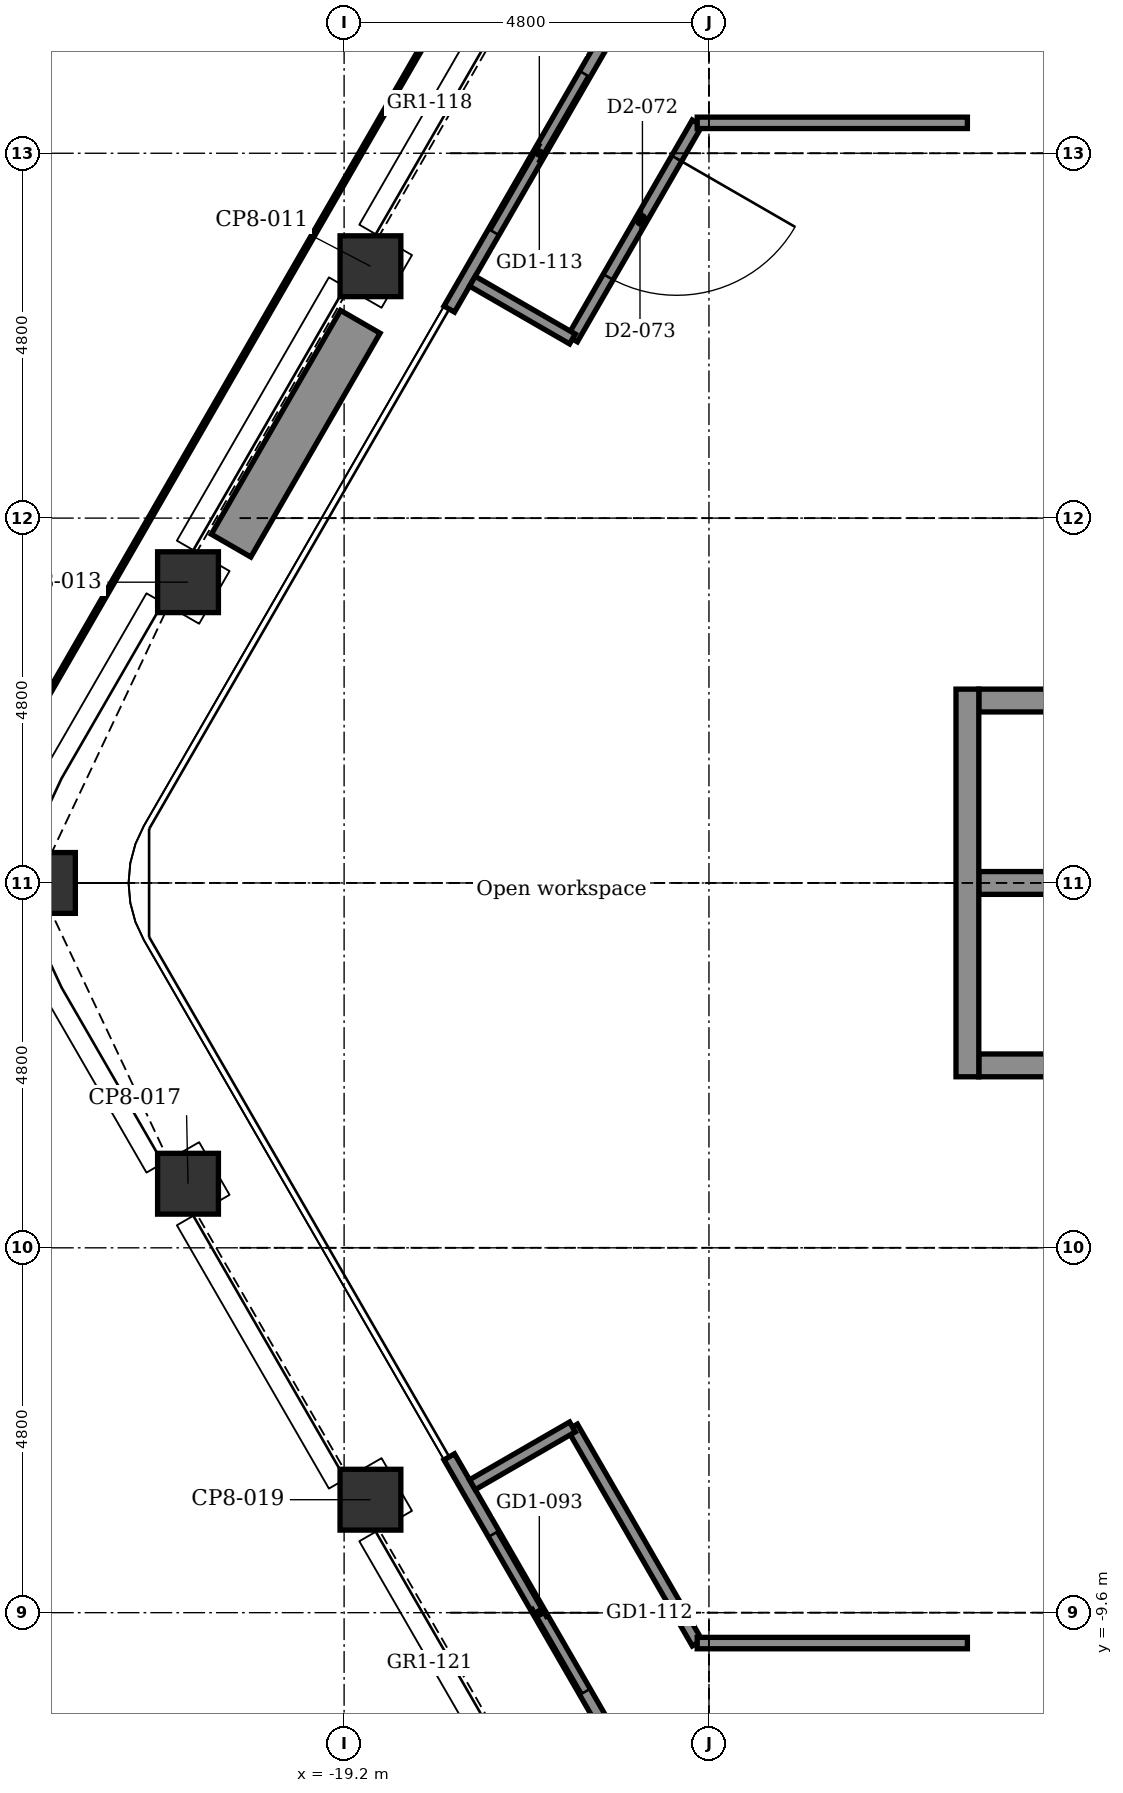
"""IFC4 building model, lengths in metres.
Left out: names, types, materials, properties, quantities, classifications, styles, units other than length and angle.
Written with IfcOpenShell. Run it as: python <this file> out.ifc"""

import sys

from ifc_helpers import new_model, si_unit, direction, frame, frame_2d, origin, origin_2d, place, context, subcontext, project, spatial, rectangle, extrude, element, fill, save


model = new_model("IFC4")
c1 = context("Model", 3, precision=1e-05, world=origin(), true_north=direction((0.0, 1.0)))
c2 = subcontext(c1, "Body", "Model", "MODEL_VIEW")
j1 = project(units=[si_unit("LENGTHUNIT", "METRE"), si_unit("PLANEANGLEUNIT", "RADIAN")], contexts=[c1])
p1 = place(None, origin())
s1 = spatial("IfcSite", under=j1, at=p1, CompositionType="ELEMENT")
p2 = place(p1, origin())
s2 = spatial("IfcBuilding", under=s1, at=p2, CompositionType="ELEMENT")
p3 = place(p2, frame((0.0, 0.0, 257.9)))
s3 = spatial("IfcBuildingStorey", under=s2, at=p3, CompositionType="ELEMENT", Elevation=257.9)
for number, where, z_axis, x_axis in (
    (1, (-18.854, -8.114, -0.15), (0.0, 0.0, 1.0), (0.866, 0.5, 0.0)),
    (2, (-21.254, -3.957, -0.15), (0.0, 0.0, 1.0), (0.866, 0.5, 0.0)),
    (3, (-23.136, 0.0, -0.15), (0.0, 0.0, 1.0), (1.0, 0.0, 0.0)),
    (4, (-21.254, 3.957, -0.15), (0.0, 0.0, 1.0), (0.5, 0.866, 0.0)),
    (5, (-18.854, 8.114, -0.15), (0.0, 0.0, 1.0), (0.5, 0.866, 0.0)),
):
    element("IfcColumn", number, at=place(p3, frame(where, z_axis=z_axis, x_axis=x_axis)), inside=s3, PredefinedType="COLUMN", context=c2, shape_type="SweptSolid", body=[
        extrude(rectangle(XDim=0.8, YDim=0.8, at=origin_2d()), origin(), (0.0, 0.0, 1.0), 3.9),
    ])
p4 = place(p3, frame((-10.85, -2.4, -0.15), z_axis=(0.0, 0.0, 1.0), x_axis=(1.0, 0.0, 0.0)))
e6 = element("IfcWall", 6, at=p4, inside=s3, PredefinedType="STANDARD", context=c2, shape_type="SweptSolid", body=[
    extrude(rectangle(XDim=1.1, YDim=0.3, at=frame_2d((0.55, 0.0))), origin(), (0.0, 0.0, 1.0), 3.9),
])
p5 = place(p3, frame((-10.85, 0.0, -0.15), z_axis=(0.0, 0.0, 1.0), x_axis=(1.0, 0.0, 0.0)))
e7 = element("IfcWall", 7, at=p5, inside=s3, PredefinedType="STANDARD", context=c2, shape_type="SweptSolid", body=[
    extrude(rectangle(XDim=3.3, YDim=0.3, at=frame_2d((1.65, 0.0))), origin(), (0.0, 0.0, 1.0), 3.9),
])
p6 = place(p3, frame((-10.85, 2.4, -0.15), z_axis=(0.0, 0.0, 1.0), x_axis=(1.0, 0.0, 0.0)))
e8 = element("IfcWall", 8, at=p6, inside=s3, PredefinedType="STANDARD", context=c2, shape_type="SweptSolid", body=[
    extrude(rectangle(XDim=1.1, YDim=0.3, at=frame_2d((0.55, 0.0))), origin(), (0.0, 0.0, 1.0), 3.9),
])
p7 = place(p3, frame((-11.0, -2.55, -0.15), z_axis=(0.0, 0.0, 1.0), x_axis=(0.0, 1.0, 0.0)))
e9 = element("IfcWall", 9, at=p7, inside=s3, PredefinedType="STANDARD", context=c2, shape_type="SweptSolid", body=[
    extrude(rectangle(XDim=5.1, YDim=0.3, at=frame_2d((2.55, 0.0))), origin(), (0.0, 0.0, 1.0), 3.9),
])
p8 = place(p3, frame((-15.447, -11.655, 0.0), z_axis=(0.0, 0.0, 1.0), x_axis=(-0.499978080042, 0.866038058908, 0.0)))
e10 = element("IfcWall", 10, at=p8, inside=s3, PredefinedType="PARTITIONING", context=c2, shape_type="SweptSolid", body=[
    extrude(rectangle(XDim=4.74, YDim=0.16, at=frame_2d((2.37, 0.0))), origin(), (0.0, 0.0, 1.0), 3.75),
])
p9 = place(p8, frame((1.17, 0.0, 0.0)))
e11 = element("IfcOpeningElement", 11, at=p9, cuts=e10, PredefinedType="OPENING", context=c2, shape_type="SweptSolid", body=[
    extrude(rectangle(XDim=2.4, YDim=2.4, at=frame_2d((1.2, 1.2))), frame((0.0, 0.09, 0.0), z_axis=(0.0, -1.0, 0.0), x_axis=(1.0, 0.0, 0.0)), (0.0, 0.0, 1.0), 0.18),
])
p10 = place(p3, frame((-17.817, 7.55, 0.0), z_axis=(0.0, 0.0, 1.0), x_axis=(0.499978080042, 0.866038058908, 0.0)))
e12 = element("IfcWall", 12, at=p10, inside=s3, PredefinedType="PARTITIONING", context=c2, shape_type="SweptSolid", body=[
    extrude(rectangle(XDim=4.74, YDim=0.16, at=frame_2d((2.37, 0.0))), origin(), (0.0, 0.0, 1.0), 3.75),
])
p11 = place(p10, frame((1.17, 0.0, 0.0)))
e13 = element("IfcOpeningElement", 13, at=p11, cuts=e12, PredefinedType="OPENING", context=c2, shape_type="SweptSolid", body=[
    extrude(rectangle(XDim=2.4, YDim=2.4, at=frame_2d((1.2, 1.2))), frame((0.0, 0.09, 0.0), z_axis=(0.0, -1.0, 0.0), x_axis=(1.0, 0.0, 0.0)), (0.0, 0.0, 1.0), 0.18),
])
p12 = place(p3, frame((-20.687, 4.438, 0.0), z_axis=(0.0, 0.0, 1.0), x_axis=(0.500008388397, 0.866020560687, 0.0)))
e14 = element("IfcWall", 14, at=p12, inside=s3, PredefinedType="USERDEFINED", context=c2, shape_type="SweptSolid", body=[
    extrude(rectangle(XDim=3.4, YDim=0.6, at=frame_2d((1.7, 0.0))), origin(), (0.0, 0.0, 1.0), 0.7),
])
p13 = place(p3, frame((-16.196, -7.157, 0.0), z_axis=(0.0, 0.0, 1.0), x_axis=(0.499954196102, -0.866051847062, 0.0)))
e15 = element("IfcWall", 15, at=p13, inside=s3, PredefinedType="PARTITIONING", context=c2, shape_type="SweptSolid", body=[
    extrude(rectangle(XDim=3.283, YDim=0.15, at=frame_2d((1.642, 0.0))), origin(), (0.0, 0.0, 1.0), 3.75),
])
p14 = place(p3, frame((-16.196, 7.157, 0.0), z_axis=(0.0, 0.0, 1.0), x_axis=(0.499954196102, 0.866051847062, 0.0)))
e16 = element("IfcWall", 16, at=p14, inside=s3, PredefinedType="PARTITIONING", context=c2, shape_type="SweptSolid", body=[
    extrude(rectangle(XDim=3.283, YDim=0.15, at=frame_2d((1.642, 0.0))), origin(), (0.0, 0.0, 1.0), 3.75),
])
p15 = place(p14, frame((0.941, 0.0, 0.0)))
e17 = element("IfcOpeningElement", 17, at=p15, cuts=e16, PredefinedType="OPENING", context=c2, shape_type="SweptSolid", body=[
    extrude(rectangle(XDim=1.8, YDim=2.1, at=frame_2d((0.9, 1.05))), frame((0.0, 0.085, 0.0), z_axis=(0.0, -1.0, 0.0), x_axis=(1.0, 0.0, 0.0)), (0.0, 0.0, 1.0), 0.17),
])
for number, where, z_axis, x_axis in (
    (18, (-17.512, 7.917, 0.0), (0.0, 0.0, 1.0), (0.866, -0.5, 0.0)),
    (19, (-17.512, -7.917, 0.0), (0.0, 0.0, 1.0), (0.866, 0.5, 0.0)),
):
    element("IfcWall", number, at=place(p3, frame(where, z_axis=z_axis, x_axis=x_axis)), inside=s3, PredefinedType="PARTITIONING", context=c2, shape_type="SweptSolid", body=[
        extrude(rectangle(XDim=1.52, YDim=0.15, at=frame_2d((0.76, 0.0))), origin(), (0.0, 0.0, 1.0), 3.75),
    ])
for number, where, z_axis, x_axis in (
    (20, (-14.555, -10.0, 0.0), (0.0, 0.0, 1.0), (1.0, 0.0, 0.0)),
    (21, (-14.555, 10.0, 0.0), (0.0, 0.0, 1.0), (1.0, 0.0, 0.0)),
):
    element("IfcWall", number, at=place(p3, frame(where, z_axis=z_axis, x_axis=x_axis)), inside=s3, PredefinedType="PARTITIONING", context=c2, shape_type="SweptSolid", body=[
        extrude(rectangle(XDim=3.555, YDim=0.15, at=frame_2d((1.777, 0.0))), origin(), (0.0, 0.0, 1.0), 3.75),
    ])
p16 = place(p9, origin())
e22 = element("IfcDoor", 22, at=p16, inside=s3, OperationType="DOUBLE_DOOR_SLIDING", PredefinedType="DOOR", context=c2, shape_type="SweptSolid", body=[
    extrude(rectangle(XDim=2.4, YDim=2.4, at=frame_2d((1.2, 1.2))), frame((0.0, 0.025, 0.0), z_axis=(0.0, -1.0, 0.0), x_axis=(1.0, 0.0, 0.0)), (0.0, 0.0, 1.0), 0.05),
])
fill(e11, e22)
p17 = place(p11, origin())
e23 = element("IfcDoor", 23, at=p17, inside=s3, OperationType="DOUBLE_DOOR_SLIDING", PredefinedType="DOOR", context=c2, shape_type="SweptSolid", body=[
    extrude(rectangle(XDim=2.4, YDim=2.4, at=frame_2d((1.2, 1.2))), frame((0.0, 0.025, 0.0), z_axis=(0.0, -1.0, 0.0), x_axis=(1.0, 0.0, 0.0)), (0.0, 0.0, 1.0), 0.05),
])
fill(e13, e23)
p18 = place(p15, frame((1.8, 0.0, 0.0), z_axis=(0.0, 0.0, 1.0), x_axis=(-1.0, 0.0, 0.0)))
e24 = element("IfcDoor", 24, at=p18, inside=s3, OperationType="SINGLE_SWING_RIGHT", PredefinedType="DOOR", context=c2, shape_type="SweptSolid", body=[
    extrude(rectangle(XDim=1.8, YDim=2.1, at=frame_2d((0.9, 1.05))), frame((0.0, 0.025, 0.0), z_axis=(0.0, -1.0, 0.0), x_axis=(1.0, 0.0, 0.0)), (0.0, 0.0, 1.0), 0.05),
])
fill(e17, e24)
save(model, sys.argv[1])
